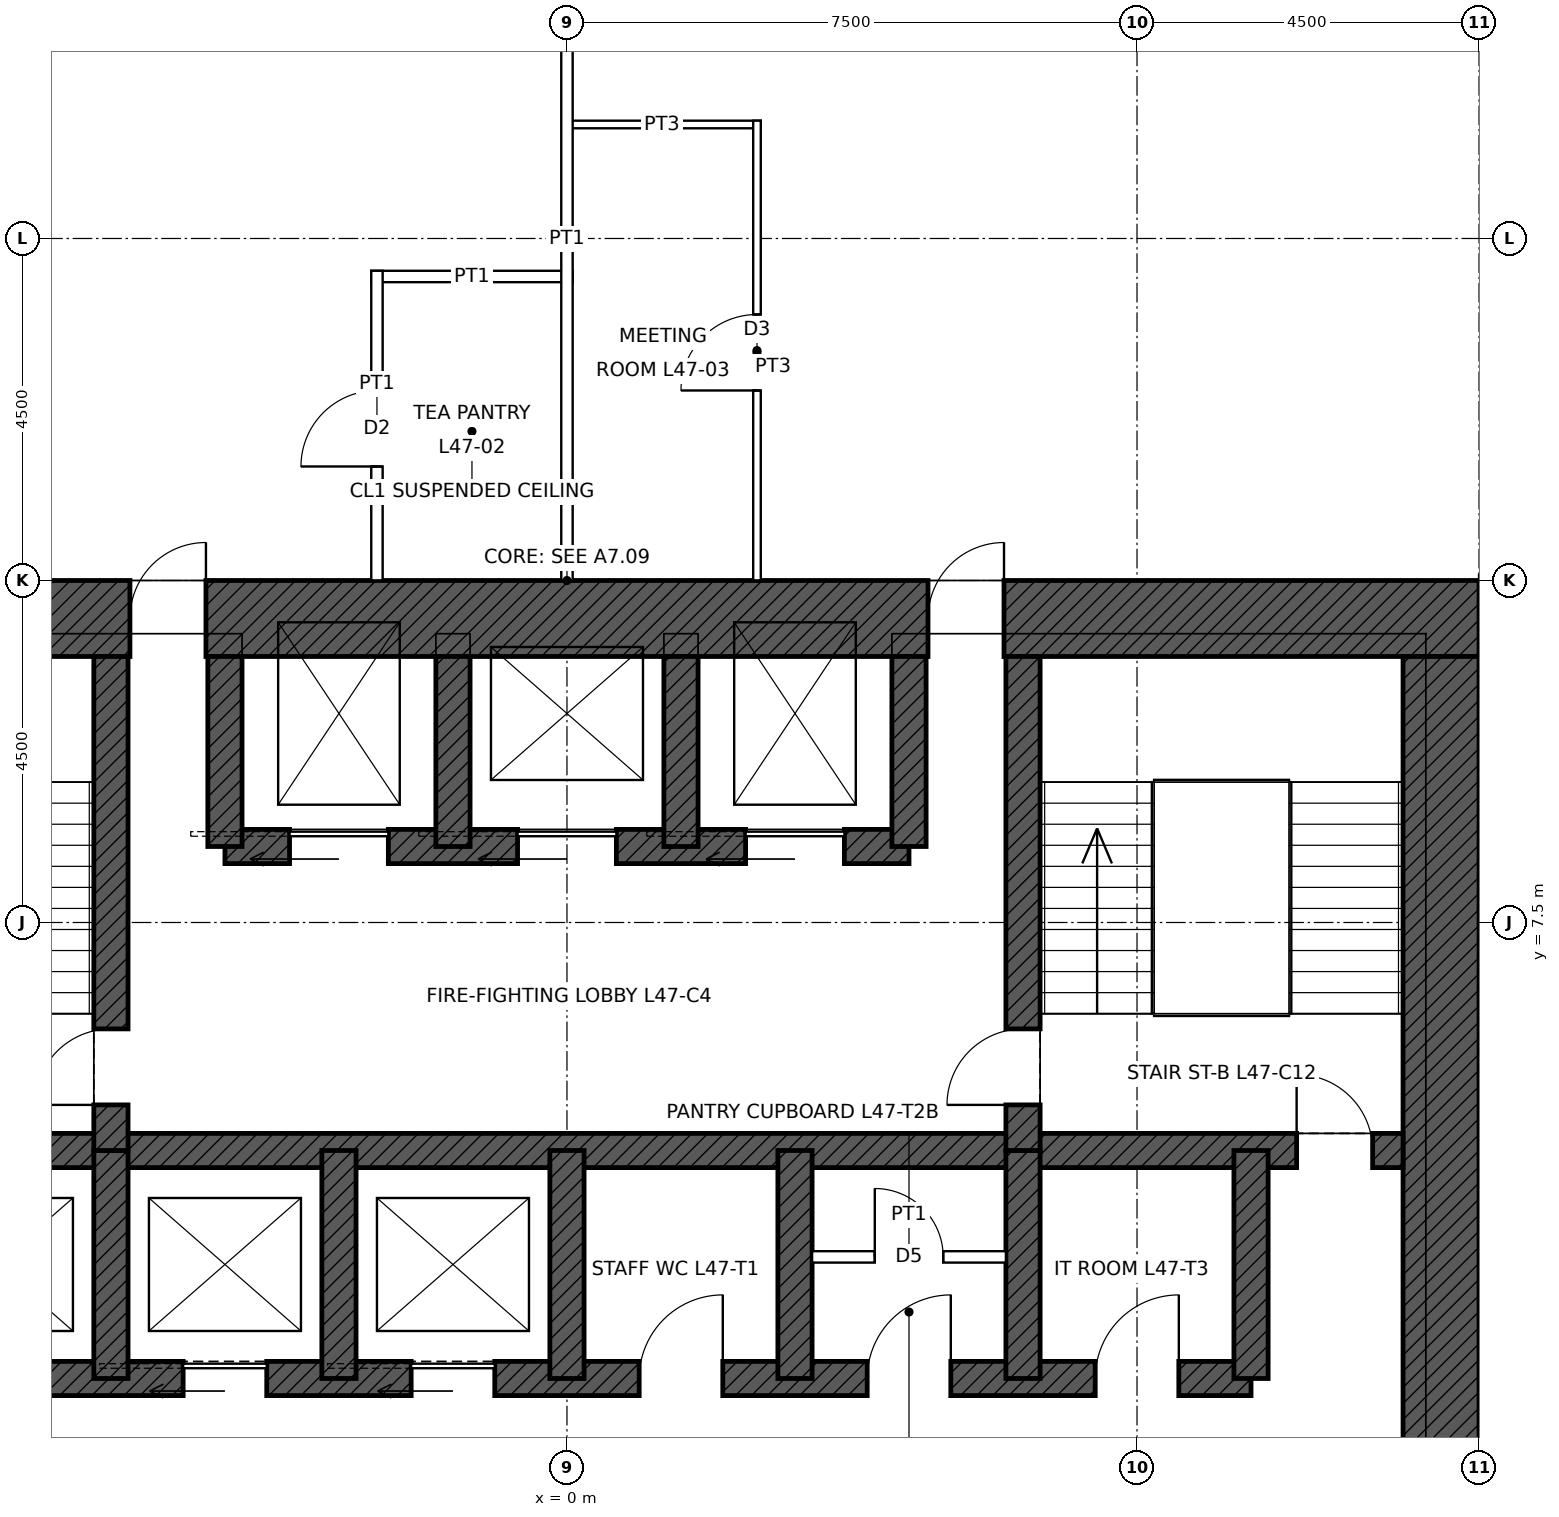
"""IFC4 building model, lengths in metres.
Left out: names, types, materials, properties, quantities, classifications, styles, units other than length and angle.
Written with IfcOpenShell. Run it as: python <this file> out.ifc"""

import sys

from ifc_helpers import new_model, si_unit, direction, frame, frame_2d, origin, place, context, subcontext, project, spatial, rectangle, extrude, element, fill, save


model = new_model("IFC4")
c1 = context("Model", 3, precision=1e-05, world=origin(), true_north=direction((0.0, 1.0)))
c2 = subcontext(c1, "Body", "Model", "MODEL_VIEW")
j1 = project(units=[si_unit("LENGTHUNIT", "METRE"), si_unit("PLANEANGLEUNIT", "RADIAN")], contexts=[c1])
p1 = place(None, origin())
s1 = spatial("IfcSite", under=j1, at=p1, CompositionType="ELEMENT")
p2 = place(p1, origin())
s2 = spatial("IfcBuilding", under=s1, at=p2, CompositionType="ELEMENT")
p3 = place(p2, frame((0.0, 0.0, 221.9)))
s3 = spatial("IfcBuildingStorey", under=s2, at=p3, CompositionType="ELEMENT", Elevation=221.9)
p4 = place(p3, frame((-12.0, 11.5, 0.0), z_axis=(0.0, 0.0, 1.0), x_axis=(1.0, 0.0, 0.0)))
e1 = element("IfcWall", 1, at=p4, inside=s3, PredefinedType="SHEAR", context=c2, shape_type="SweptSolid", body=[
    extrude(rectangle(XDim=24.0, YDim=1.0, at=frame_2d((12.0, 0.0))), origin(), (0.0, 0.0, 1.0), 4.0),
])
p5 = place(p4, frame((6.25, 0.0, 0.0)))
e2 = element("IfcOpeningElement", 2, at=p5, cuts=e1, PredefinedType="OPENING", context=c2, shape_type="SweptSolid", body=[
    extrude(rectangle(XDim=1.0, YDim=2.4, at=frame_2d((0.5, 1.2))), frame((0.0, 0.51, 0.0), z_axis=(0.0, -1.0, 0.0), x_axis=(1.0, 0.0, 0.0)), (0.0, 0.0, 1.0), 1.02),
])
p6 = place(p4, frame((16.75, 0.0, 0.0)))
e3 = element("IfcOpeningElement", 3, at=p6, cuts=e1, PredefinedType="OPENING", context=c2, shape_type="SweptSolid", body=[
    extrude(rectangle(XDim=1.0, YDim=2.4, at=frame_2d((0.5, 1.2))), frame((0.0, 0.51, 0.0), z_axis=(0.0, -1.0, 0.0), x_axis=(1.0, 0.0, 0.0)), (0.0, 0.0, 1.0), 1.02),
])
p7 = place(p3, frame((11.5, 11.0, 0.0), z_axis=(0.0, 0.0, 1.0), x_axis=(0.0, -1.0, 0.0)))
e4 = element("IfcWall", 4, at=p7, inside=s3, PredefinedType="SHEAR", context=c2, shape_type="SweptSolid", body=[
    extrude(rectangle(XDim=22.0, YDim=1.0, at=frame_2d((11.0, 0.0))), origin(), (0.0, 0.0, 1.0), 4.0),
])
p8 = place(p7, frame((10.5, 0.0, 0.0)))
e5 = element("IfcOpeningElement", 5, at=p8, cuts=e4, PredefinedType="OPENING", context=c2, shape_type="SweptSolid", body=[
    extrude(rectangle(XDim=1.0, YDim=2.4, at=frame_2d((0.5, 1.2))), frame((0.0, 0.51, 0.0), z_axis=(0.0, -1.0, 0.0), x_axis=(1.0, 0.0, 0.0)), (0.0, 0.0, 1.0), 1.02),
])
p9 = place(p3, frame((-11.0, 4.5, 0.0), z_axis=(0.0, 0.0, 1.0), x_axis=(1.0, 0.0, 0.0)))
e6 = element("IfcWall", 6, at=p9, inside=s3, PredefinedType="SHEAR", context=c2, shape_type="SweptSolid", body=[
    extrude(rectangle(XDim=22.0, YDim=0.45, at=frame_2d((11.0, 0.0))), origin(), (0.0, 0.0, 1.0), 4.0),
])
p10 = place(p9, frame((0.4, 0.0, 0.0)))
e7 = element("IfcOpeningElement", 7, at=p10, cuts=e6, PredefinedType="OPENING", context=c2, shape_type="SweptSolid", body=[
    extrude(rectangle(XDim=1.0, YDim=2.1, at=frame_2d((0.5, 1.05))), frame((0.0, 0.235, 0.0), z_axis=(0.0, -1.0, 0.0), x_axis=(1.0, 0.0, 0.0)), (0.0, 0.0, 1.0), 0.47),
])
p11 = place(p9, frame((20.6, 0.0, 0.0)))
e8 = element("IfcOpeningElement", 8, at=p11, cuts=e6, PredefinedType="OPENING", context=c2, shape_type="SweptSolid", body=[
    extrude(rectangle(XDim=1.0, YDim=2.1, at=frame_2d((0.5, 1.05))), frame((0.0, 0.235, 0.0), z_axis=(0.0, -1.0, 0.0), x_axis=(1.0, 0.0, 0.0)), (0.0, 0.0, 1.0), 0.47),
])
p12 = place(p3, frame((-9.0, 1.5, 0.0), z_axis=(0.0, 0.0, 1.0), x_axis=(1.0, 0.0, 0.0)))
e9 = element("IfcWall", 9, at=p12, inside=s3, PredefinedType="SHEAR", context=c2, shape_type="SweptSolid", body=[
    extrude(rectangle(XDim=18.0, YDim=0.45, at=frame_2d((9.0, 0.0))), origin(), (0.0, 0.0, 1.0), 4.0),
])
p13 = place(p12, frame((0.95, 0.0, 0.0)))
e10 = element("IfcOpeningElement", 10, at=p13, cuts=e9, PredefinedType="OPENING", context=c2, shape_type="SweptSolid", body=[
    extrude(rectangle(XDim=1.1, YDim=2.1, at=frame_2d((0.55, 1.05))), frame((0.0, 0.235, 0.0), z_axis=(0.0, -1.0, 0.0), x_axis=(1.0, 0.0, 0.0)), (0.0, 0.0, 1.0), 0.47),
])
p14 = place(p12, frame((3.95, 0.0, 0.0)))
e11 = element("IfcOpeningElement", 11, at=p14, cuts=e9, PredefinedType="OPENING", context=c2, shape_type="SweptSolid", body=[
    extrude(rectangle(XDim=1.1, YDim=2.1, at=frame_2d((0.55, 1.05))), frame((0.0, 0.235, 0.0), z_axis=(0.0, -1.0, 0.0), x_axis=(1.0, 0.0, 0.0)), (0.0, 0.0, 1.0), 0.47),
])
p15 = place(p12, frame((6.95, 0.0, 0.0)))
e12 = element("IfcOpeningElement", 12, at=p15, cuts=e9, PredefinedType="OPENING", context=c2, shape_type="SweptSolid", body=[
    extrude(rectangle(XDim=1.1, YDim=2.1, at=frame_2d((0.55, 1.05))), frame((0.0, 0.235, 0.0), z_axis=(0.0, -1.0, 0.0), x_axis=(1.0, 0.0, 0.0)), (0.0, 0.0, 1.0), 0.47),
])
p16 = place(p12, frame((9.95, 0.0, 0.0)))
e13 = element("IfcOpeningElement", 13, at=p16, cuts=e9, PredefinedType="OPENING", context=c2, shape_type="SweptSolid", body=[
    extrude(rectangle(XDim=1.1, YDim=2.1, at=frame_2d((0.55, 1.05))), frame((0.0, 0.235, 0.0), z_axis=(0.0, -1.0, 0.0), x_axis=(1.0, 0.0, 0.0)), (0.0, 0.0, 1.0), 0.47),
])
p17 = place(p12, frame((12.95, 0.0, 0.0)))
e14 = element("IfcOpeningElement", 14, at=p17, cuts=e9, PredefinedType="OPENING", context=c2, shape_type="SweptSolid", body=[
    extrude(rectangle(XDim=1.1, YDim=2.1, at=frame_2d((0.55, 1.05))), frame((0.0, 0.235, 0.0), z_axis=(0.0, -1.0, 0.0), x_axis=(1.0, 0.0, 0.0)), (0.0, 0.0, 1.0), 0.47),
])
p18 = place(p12, frame((15.95, 0.0, 0.0)))
e15 = element("IfcOpeningElement", 15, at=p18, cuts=e9, PredefinedType="OPENING", context=c2, shape_type="SweptSolid", body=[
    extrude(rectangle(XDim=1.1, YDim=2.1, at=frame_2d((0.55, 1.05))), frame((0.0, 0.235, 0.0), z_axis=(0.0, -1.0, 0.0), x_axis=(1.0, 0.0, 0.0)), (0.0, 0.0, 1.0), 0.47),
])
p19 = place(p3, frame((-4.5, 8.5, 0.0), z_axis=(0.0, 0.0, 1.0), x_axis=(1.0, 0.0, 0.0)))
e16 = element("IfcWall", 16, at=p19, inside=s3, PredefinedType="SHEAR", context=c2, shape_type="SweptSolid", body=[
    extrude(rectangle(XDim=9.0, YDim=0.45, at=frame_2d((4.5, 0.0))), origin(), (0.0, 0.0, 1.0), 4.0),
])
p20 = place(p19, frame((0.85, 0.0, 0.0)))
e17 = element("IfcOpeningElement", 17, at=p20, cuts=e16, PredefinedType="OPENING", context=c2, shape_type="SweptSolid", body=[
    extrude(rectangle(XDim=1.3, YDim=2.4, at=frame_2d((0.65, 1.2))), frame((0.0, 0.235, 0.0), z_axis=(0.0, -1.0, 0.0), x_axis=(1.0, 0.0, 0.0)), (0.0, 0.0, 1.0), 0.47),
])
p21 = place(p19, frame((6.85, 0.0, 0.0)))
e18 = element("IfcOpeningElement", 18, at=p21, cuts=e16, PredefinedType="OPENING", context=c2, shape_type="SweptSolid", body=[
    extrude(rectangle(XDim=1.3, YDim=2.4, at=frame_2d((0.65, 1.2))), frame((0.0, 0.235, 0.0), z_axis=(0.0, -1.0, 0.0), x_axis=(1.0, 0.0, 0.0)), (0.0, 0.0, 1.0), 0.47),
])
p22 = place(p19, frame((3.85, 0.0, 0.0)))
e19 = element("IfcOpeningElement", 19, at=p22, cuts=e16, PredefinedType="OPENING", context=c2, shape_type="SweptSolid", body=[
    extrude(rectangle(XDim=1.3, YDim=2.4, at=frame_2d((0.65, 1.2))), frame((0.0, 0.235, 0.0), z_axis=(0.0, -1.0, 0.0), x_axis=(1.0, 0.0, 0.0)), (0.0, 0.0, 1.0), 0.47),
])
for number, where, z_axis, x_axis in (
    (20, (9.0, 1.5, 0.0), (0.0, 0.0, 1.0), (0.0, 1.0, 0.0)),
    (21, (-6.0, 1.5, 0.0), (0.0, 0.0, 1.0), (0.0, 1.0, 0.0)),
    (22, (-3.0, 1.5, 0.0), (0.0, 0.0, 1.0), (0.0, 1.0, 0.0)),
    (23, (0.0, 1.5, 0.0), (0.0, 0.0, 1.0), (0.0, 1.0, 0.0)),
    (24, (3.0, 1.5, 0.0), (0.0, 0.0, 1.0), (0.0, 1.0, 0.0)),
    (25, (6.0, 1.5, 0.0), (0.0, 0.0, 1.0), (0.0, 1.0, 0.0)),
):
    element("IfcWall", number, at=place(p3, frame(where, z_axis=z_axis, x_axis=x_axis)), inside=s3, PredefinedType="SHEAR", context=c2, shape_type="SweptSolid", body=[
        extrude(rectangle(XDim=3.0, YDim=0.45, at=frame_2d((1.5, 0.0))), origin(), (0.0, 0.0, 1.0), 4.0),
    ])
p23 = place(p3, frame((-6.0, 4.5, 0.0), z_axis=(0.0, 0.0, 1.0), x_axis=(0.0, 1.0, 0.0)))
e26 = element("IfcWall", 26, at=p23, inside=s3, PredefinedType="SHEAR", context=c2, shape_type="SweptSolid", body=[
    extrude(rectangle(XDim=6.5, YDim=0.45, at=frame_2d((3.25, 0.0))), origin(), (0.0, 0.0, 1.0), 4.0),
])
p24 = place(p23, frame((0.6, 0.0, 0.0)))
e27 = element("IfcOpeningElement", 27, at=p24, cuts=e26, PredefinedType="OPENING", context=c2, shape_type="SweptSolid", body=[
    extrude(rectangle(XDim=1.0, YDim=2.1, at=frame_2d((0.5, 1.05))), frame((0.0, 0.235, 0.0), z_axis=(0.0, -1.0, 0.0), x_axis=(1.0, 0.0, 0.0)), (0.0, 0.0, 1.0), 0.47),
])
p25 = place(p3, frame((6.0, 4.5, 0.0), z_axis=(0.0, 0.0, 1.0), x_axis=(0.0, 1.0, 0.0)))
e28 = element("IfcWall", 28, at=p25, inside=s3, PredefinedType="SHEAR", context=c2, shape_type="SweptSolid", body=[
    extrude(rectangle(XDim=6.5, YDim=0.45, at=frame_2d((3.25, 0.0))), origin(), (0.0, 0.0, 1.0), 4.0),
])
p26 = place(p25, frame((0.6, 0.0, 0.0)))
e29 = element("IfcOpeningElement", 29, at=p26, cuts=e28, PredefinedType="OPENING", context=c2, shape_type="SweptSolid", body=[
    extrude(rectangle(XDim=1.0, YDim=2.1, at=frame_2d((0.5, 1.05))), frame((0.0, 0.235, 0.0), z_axis=(0.0, -1.0, 0.0), x_axis=(1.0, 0.0, 0.0)), (0.0, 0.0, 1.0), 0.47),
])
for number, where, z_axis, x_axis in (
    (30, (-4.5, 8.5, 0.0), (0.0, 0.0, 1.0), (0.0, 1.0, 0.0)),
    (31, (4.5, 8.5, 0.0), (0.0, 0.0, 1.0), (0.0, 1.0, 0.0)),
    (32, (-1.5, 8.5, 0.0), (0.0, 0.0, 1.0), (0.0, 1.0, 0.0)),
    (33, (1.5, 8.5, 0.0), (0.0, 0.0, 1.0), (0.0, 1.0, 0.0)),
):
    element("IfcWall", number, at=place(p3, frame(where, z_axis=z_axis, x_axis=x_axis)), inside=s3, PredefinedType="SHEAR", context=c2, shape_type="SweptSolid", body=[
        extrude(rectangle(XDim=2.5, YDim=0.45, at=frame_2d((1.25, 0.0))), origin(), (0.0, 0.0, 1.0), 4.0),
    ])
p27 = place(p3, frame((-2.575, 16.0, 0.0), z_axis=(0.0, 0.0, 1.0), x_axis=(1.0, 0.0, 0.0)))
e34 = element("IfcWall", 34, at=p27, inside=s3, PredefinedType="PARTITIONING", context=c2, shape_type="SweptSolid", body=[
    extrude(rectangle(XDim=2.65, YDim=0.15, at=frame_2d((1.325, 0.0))), origin(), (0.0, 0.0, 1.0), 3.85),
])
p28 = place(p3, frame((-0.05, 18.0, 0.0), z_axis=(0.0, 0.0, 1.0), x_axis=(1.0, 0.0, 0.0)))
e35 = element("IfcWall", 35, at=p28, inside=s3, PredefinedType="PARTITIONING", context=c2, shape_type="SweptSolid", body=[
    extrude(rectangle(XDim=2.6, YDim=0.1, at=frame_2d((1.3, 0.0))), origin(), (0.0, 0.0, 1.0), 3.85),
])
p29 = place(p3, frame((-2.5, 12.0, 0.0), z_axis=(0.0, 0.0, 1.0), x_axis=(0.0, 1.0, 0.0)))
e36 = element("IfcWall", 36, at=p29, inside=s3, PredefinedType="PARTITIONING", context=c2, shape_type="SweptSolid", body=[
    extrude(rectangle(XDim=4.075, YDim=0.15, at=frame_2d((2.038, 0.0))), origin(), (0.0, 0.0, 1.0), 3.85),
])
p30 = place(p29, frame((1.5, 0.0, 0.0)))
e37 = element("IfcOpeningElement", 37, at=p30, cuts=e36, PredefinedType="OPENING", context=c2, shape_type="SweptSolid", body=[
    extrude(rectangle(XDim=1.0, YDim=2.1, at=frame_2d((0.5, 1.05))), frame((0.0, 0.085, 0.0), z_axis=(0.0, -1.0, 0.0), x_axis=(1.0, 0.0, 0.0)), (0.0, 0.0, 1.0), 0.17),
])
p31 = place(p3, frame((0.0, 12.0, 0.0), z_axis=(0.0, 0.0, 1.0), x_axis=(0.0, 1.0, 0.0)))
e38 = element("IfcWall", 38, at=p31, inside=s3, PredefinedType="PARTITIONING", context=c2, shape_type="SweptSolid", body=[
    extrude(rectangle(XDim=8.99, YDim=0.15, at=frame_2d((4.495, 0.0))), origin(), (0.0, 0.0, 1.0), 3.238),
])
p32 = place(p3, frame((2.5, 12.0, 0.0), z_axis=(0.0, 0.0, 1.0), x_axis=(0.0, 1.0, 0.0)))
e39 = element("IfcWall", 39, at=p32, inside=s3, PredefinedType="PARTITIONING", context=c2, shape_type="SweptSolid", body=[
    extrude(rectangle(XDim=6.05, YDim=0.1, at=frame_2d((3.025, 0.0))), origin(), (0.0, 0.0, 1.0), 3.85),
])
p33 = place(p32, frame((2.5, 0.0, 0.0)))
e40 = element("IfcOpeningElement", 40, at=p33, cuts=e39, PredefinedType="OPENING", context=c2, shape_type="SweptSolid", body=[
    extrude(rectangle(XDim=1.0, YDim=2.1, at=frame_2d((0.5, 1.05))), frame((0.0, 0.06, 0.0), z_axis=(0.0, -1.0, 0.0), x_axis=(1.0, 0.0, 0.0)), (0.0, 0.0, 1.0), 0.12),
])
p34 = place(p3, frame((3.225, 3.1, 0.0), z_axis=(0.0, 0.0, 1.0), x_axis=(1.0, 0.0, 0.0)))
e41 = element("IfcWall", 41, at=p34, inside=s3, PredefinedType="PARTITIONING", context=c2, shape_type="SweptSolid", body=[
    extrude(rectangle(XDim=2.55, YDim=0.15, at=frame_2d((1.275, 0.0))), origin(), (0.0, 0.0, 1.0), 3.75),
])
p35 = place(p34, frame((0.825, 0.0, 0.0)))
e42 = element("IfcOpeningElement", 42, at=p35, cuts=e41, PredefinedType="OPENING", context=c2, shape_type="SweptSolid", body=[
    extrude(rectangle(XDim=0.9, YDim=2.1, at=frame_2d((0.45, 1.05))), frame((0.0, 0.085, 0.0), z_axis=(0.0, -1.0, 0.0), x_axis=(1.0, 0.0, 0.0)), (0.0, 0.0, 1.0), 0.17),
])
p36 = place(p11, origin())
e43 = element("IfcDoor", 43, at=p36, inside=s3, OperationType="SINGLE_SWING_LEFT", PredefinedType="DOOR", context=c2, shape_type="SweptSolid", body=[
    extrude(rectangle(XDim=1.0, YDim=2.1, at=frame_2d((0.5, 1.05))), frame((0.0, 0.025, 0.0), z_axis=(0.0, -1.0, 0.0), x_axis=(1.0, 0.0, 0.0)), (0.0, 0.0, 1.0), 0.05),
])
fill(e8, e43)
p37 = place(p24, origin())
e44 = element("IfcDoor", 44, at=p37, inside=s3, OperationType="SINGLE_SWING_LEFT", PredefinedType="DOOR", context=c2, shape_type="SweptSolid", body=[
    extrude(rectangle(XDim=1.0, YDim=2.1, at=frame_2d((0.5, 1.05))), frame((0.0, 0.025, 0.0), z_axis=(0.0, -1.0, 0.0), x_axis=(1.0, 0.0, 0.0)), (0.0, 0.0, 1.0), 0.05),
])
fill(e27, e44)
p38 = place(p26, origin())
e45 = element("IfcDoor", 45, at=p38, inside=s3, OperationType="SINGLE_SWING_LEFT", PredefinedType="DOOR", context=c2, shape_type="SweptSolid", body=[
    extrude(rectangle(XDim=1.0, YDim=2.1, at=frame_2d((0.5, 1.05))), frame((0.0, 0.025, 0.0), z_axis=(0.0, -1.0, 0.0), x_axis=(1.0, 0.0, 0.0)), (0.0, 0.0, 1.0), 0.05),
])
fill(e29, e45)
p39 = place(p5, origin())
e46 = element("IfcDoor", 46, at=p39, inside=s3, OperationType="SINGLE_SWING_RIGHT", PredefinedType="DOOR", context=c2, shape_type="SweptSolid", body=[
    extrude(rectangle(XDim=1.0, YDim=2.4, at=frame_2d((0.5, 1.2))), frame((0.0, 0.485, 0.0), z_axis=(0.0, -1.0, 0.0), x_axis=(1.0, 0.0, 0.0)), (0.0, 0.0, 1.0), 0.05),
])
fill(e2, e46)
p40 = place(p6, origin())
e47 = element("IfcDoor", 47, at=p40, inside=s3, OperationType="SINGLE_SWING_RIGHT", PredefinedType="DOOR", context=c2, shape_type="SweptSolid", body=[
    extrude(rectangle(XDim=1.0, YDim=2.4, at=frame_2d((0.5, 1.2))), frame((0.0, 0.485, 0.0), z_axis=(0.0, -1.0, 0.0), x_axis=(1.0, 0.0, 0.0)), (0.0, 0.0, 1.0), 0.05),
])
fill(e3, e47)
p41 = place(p20, origin())
e48 = element("IfcDoor", 48, at=p41, inside=s3, OperationType="SLIDING_TO_LEFT", PredefinedType="DOOR", context=c2, shape_type="SweptSolid", body=[
    extrude(rectangle(XDim=1.3, YDim=2.4, at=frame_2d((0.65, 1.2))), frame((0.0, 0.025, 0.0), z_axis=(0.0, -1.0, 0.0), x_axis=(1.0, 0.0, 0.0)), (0.0, 0.0, 1.0), 0.05),
])
fill(e17, e48)
p42 = place(p21, origin())
e49 = element("IfcDoor", 49, at=p42, inside=s3, OperationType="SLIDING_TO_LEFT", PredefinedType="DOOR", context=c2, shape_type="SweptSolid", body=[
    extrude(rectangle(XDim=1.3, YDim=2.4, at=frame_2d((0.65, 1.2))), frame((0.0, 0.025, 0.0), z_axis=(0.0, -1.0, 0.0), x_axis=(1.0, 0.0, 0.0)), (0.0, 0.0, 1.0), 0.05),
])
fill(e18, e49)
p43 = place(p22, origin())
e50 = element("IfcDoor", 50, at=p43, inside=s3, OperationType="SLIDING_TO_LEFT", PredefinedType="DOOR", context=c2, shape_type="SweptSolid", body=[
    extrude(rectangle(XDim=1.3, YDim=2.4, at=frame_2d((0.65, 1.2))), frame((0.0, 0.025, 0.0), z_axis=(0.0, -1.0, 0.0), x_axis=(1.0, 0.0, 0.0)), (0.0, 0.0, 1.0), 0.05),
])
fill(e19, e50)
p44 = place(p14, origin())
e51 = element("IfcDoor", 51, at=p44, inside=s3, OperationType="SLIDING_TO_LEFT", PredefinedType="DOOR", context=c2, shape_type="SweptSolid", body=[
    extrude(rectangle(XDim=1.1, YDim=2.1, at=frame_2d((0.55, 1.05))), frame((0.0, 0.025, 0.0), z_axis=(0.0, -1.0, 0.0), x_axis=(1.0, 0.0, 0.0)), (0.0, 0.0, 1.0), 0.05),
])
fill(e11, e51)
p45 = place(p15, origin())
e52 = element("IfcDoor", 52, at=p45, inside=s3, OperationType="SLIDING_TO_LEFT", PredefinedType="DOOR", context=c2, shape_type="SweptSolid", body=[
    extrude(rectangle(XDim=1.1, YDim=2.1, at=frame_2d((0.55, 1.05))), frame((0.0, 0.025, 0.0), z_axis=(0.0, -1.0, 0.0), x_axis=(1.0, 0.0, 0.0)), (0.0, 0.0, 1.0), 0.05),
])
fill(e12, e52)
p46 = place(p16, origin())
e53 = element("IfcDoor", 53, at=p46, inside=s3, OperationType="SINGLE_SWING_RIGHT", PredefinedType="DOOR", context=c2, shape_type="SweptSolid", body=[
    extrude(rectangle(XDim=1.1, YDim=2.1, at=frame_2d((0.55, 1.05))), frame((0.0, 0.025, 0.0), z_axis=(0.0, -1.0, 0.0), x_axis=(1.0, 0.0, 0.0)), (0.0, 0.0, 1.0), 0.05),
])
fill(e13, e53)
p47 = place(p17, origin())
e54 = element("IfcDoor", 54, at=p47, inside=s3, OperationType="SINGLE_SWING_RIGHT", PredefinedType="DOOR", context=c2, shape_type="SweptSolid", body=[
    extrude(rectangle(XDim=1.1, YDim=2.1, at=frame_2d((0.55, 1.05))), frame((0.0, 0.025, 0.0), z_axis=(0.0, -1.0, 0.0), x_axis=(1.0, 0.0, 0.0)), (0.0, 0.0, 1.0), 0.05),
])
fill(e14, e54)
p48 = place(p35, origin())
e55 = element("IfcDoor", 55, at=p48, inside=s3, OperationType="SINGLE_SWING_LEFT", PredefinedType="DOOR", context=c2, shape_type="SweptSolid", body=[
    extrude(rectangle(XDim=0.9, YDim=2.1, at=frame_2d((0.45, 1.05))), frame((0.0, 0.025, 0.0), z_axis=(0.0, -1.0, 0.0), x_axis=(1.0, 0.0, 0.0)), (0.0, 0.0, 1.0), 0.05),
])
fill(e42, e55)
p49 = place(p18, origin())
e56 = element("IfcDoor", 56, at=p49, inside=s3, OperationType="SINGLE_SWING_RIGHT", PredefinedType="DOOR", context=c2, shape_type="SweptSolid", body=[
    extrude(rectangle(XDim=1.1, YDim=2.1, at=frame_2d((0.55, 1.05))), frame((0.0, 0.025, 0.0), z_axis=(0.0, -1.0, 0.0), x_axis=(1.0, 0.0, 0.0)), (0.0, 0.0, 1.0), 0.05),
])
fill(e15, e56)
p50 = place(p30, origin())
e57 = element("IfcDoor", 57, at=p50, inside=s3, OperationType="SINGLE_SWING_LEFT", PredefinedType="DOOR", context=c2, shape_type="SweptSolid", body=[
    extrude(rectangle(XDim=1.0, YDim=2.1, at=frame_2d((0.5, 1.05))), frame((0.0, 0.025, 0.0), z_axis=(0.0, -1.0, 0.0), x_axis=(1.0, 0.0, 0.0)), (0.0, 0.0, 1.0), 0.05),
])
fill(e37, e57)
p51 = place(p33, origin())
e58 = element("IfcDoor", 58, at=p51, inside=s3, OperationType="SINGLE_SWING_LEFT", PredefinedType="DOOR", context=c2, shape_type="SweptSolid", body=[
    extrude(rectangle(XDim=1.0, YDim=2.1, at=frame_2d((0.5, 1.05))), frame((0.0, 0.025, 0.0), z_axis=(0.0, -1.0, 0.0), x_axis=(1.0, 0.0, 0.0)), (0.0, 0.0, 1.0), 0.05),
])
fill(e40, e58)
save(model, sys.argv[1])
